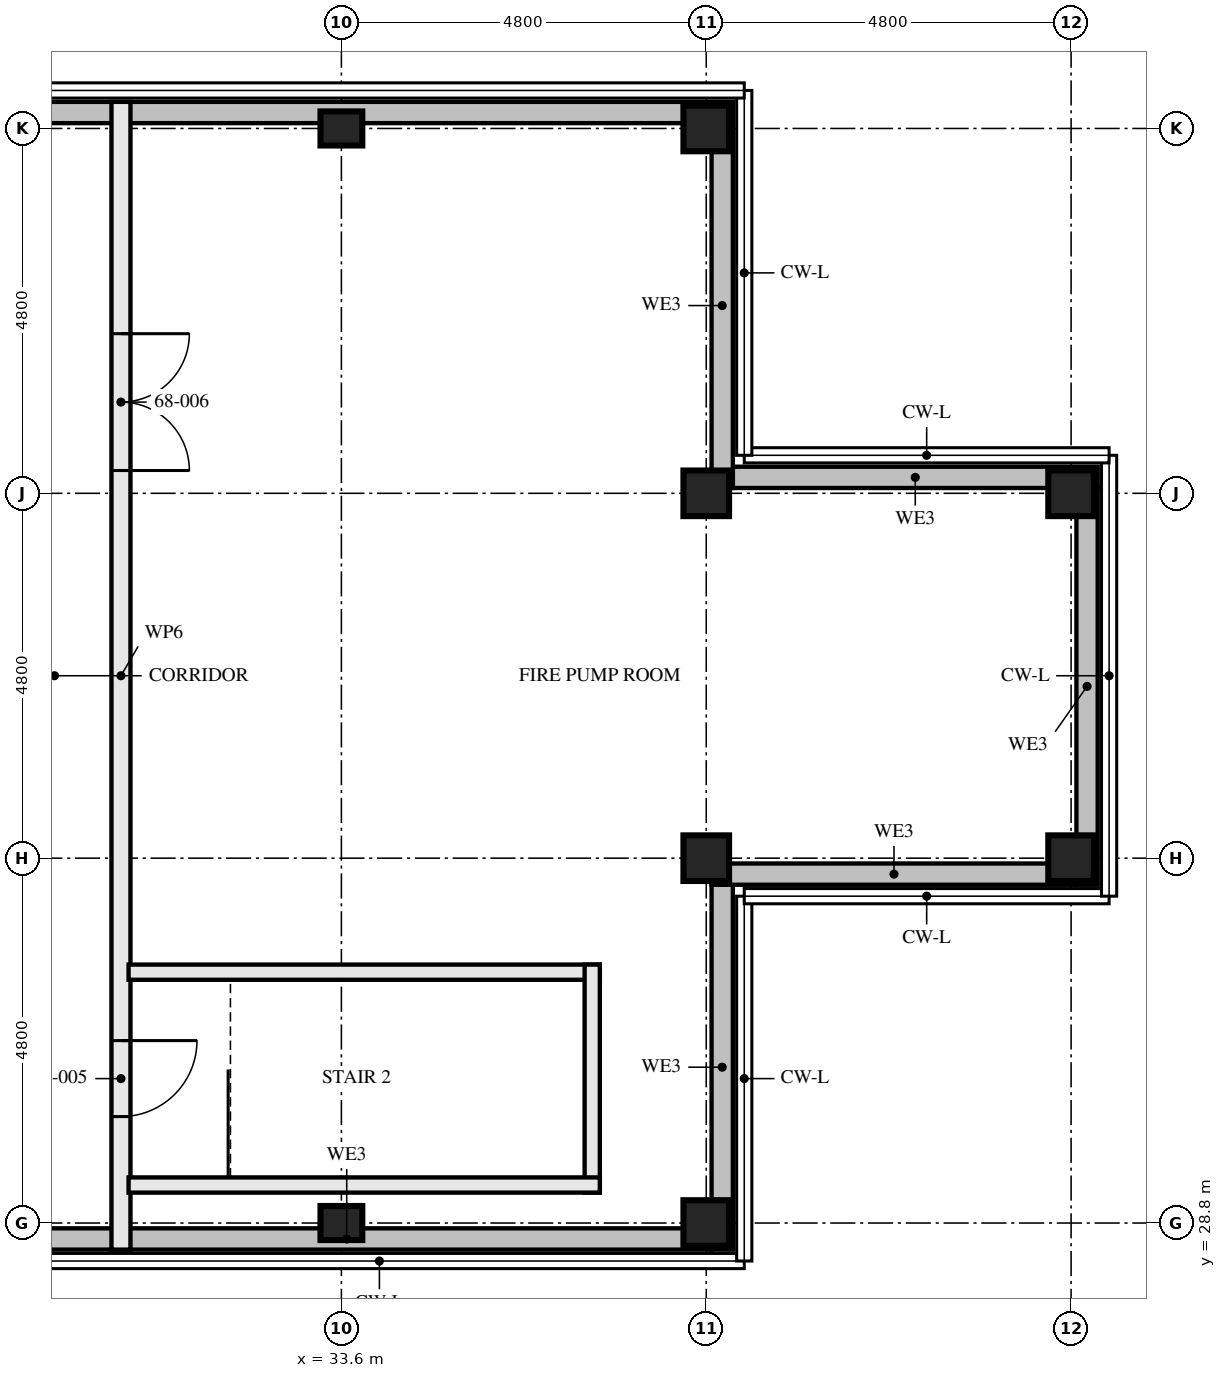
"""IFC4 building model, lengths in metres.
Left out: names, types, materials, properties, quantities, classifications, styles, units other than length and angle.
Written with IfcOpenShell. Run it as: python <this file> out.ifc"""

import sys

from ifc_helpers import new_model, si_unit, direction, frame, frame_2d, origin, origin_2d, place, context, subcontext, project, spatial, rectangle, hollow_rectangle, i_section, extrude, element, fill, save


model = new_model("IFC4")
c1 = context("Model", 3, precision=1e-05, world=origin(), true_north=direction((0.0, 1.0)))
c2 = subcontext(c1, "Body", "Model", "MODEL_VIEW")
j1 = project(units=[si_unit("LENGTHUNIT", "METRE"), si_unit("PLANEANGLEUNIT", "RADIAN")], contexts=[c1])
p1 = place(None, origin())
s1 = spatial("IfcSite", under=j1, at=p1, CompositionType="ELEMENT")
p2 = place(p1, origin())
s2 = spatial("IfcBuilding", under=s1, at=p2, CompositionType="ELEMENT")
p3 = place(p2, frame((0.0, 0.0, 248.0)))
s3 = spatial("IfcBuildingStorey", under=s2, at=p3, CompositionType="ELEMENT", Elevation=248.0)
for number, where, z_axis, x_axis in (
    (1, (33.6, 28.8, 0.0), (0.0, 0.0, 1.0), (0.0, 1.0, 0.0)),
    (2, (33.6, 43.2, 0.0), (0.0, 0.0, 1.0), (0.0, 1.0, 0.0)),
):
    element("IfcColumn", number, at=place(p3, frame(where, z_axis=z_axis, x_axis=x_axis)), inside=s3, PredefinedType="COLUMN", context=c2, shape_type="SweptSolid", body=[
        extrude(i_section(OverallWidth=0.448, OverallDepth=0.55, WebThickness=0.072, FlangeThickness=0.115, FilletRadius=0.015, at=origin_2d()), origin(), (0.0, 0.0, 1.0), 4.25),
    ])
for number, where, z_axis, x_axis in (
    (3, (38.4, 28.8, 0.0), (0.0, 0.0, 1.0), (0.0, 1.0, 0.0)),
    (4, (38.4, 33.6, 0.0), (0.0, 0.0, 1.0), (0.0, 1.0, 0.0)),
    (5, (38.4, 38.4, 0.0), (0.0, 0.0, 1.0), (0.0, 1.0, 0.0)),
    (6, (38.4, 43.2, 0.0), (0.0, 0.0, 1.0), (0.0, 1.0, 0.0)),
    (7, (43.2, 33.6, 0.0), (0.0, 0.0, 1.0), (0.0, 1.0, 0.0)),
    (8, (43.2, 38.4, 0.0), (0.0, 0.0, 1.0), (0.0, 1.0, 0.0)),
):
    element("IfcColumn", number, at=place(p3, frame(where, z_axis=z_axis, x_axis=x_axis)), inside=s3, PredefinedType="COLUMN", context=c2, shape_type="SweptSolid", body=[
        extrude(hollow_rectangle(XDim=0.6, YDim=0.6, WallThickness=0.05, at=origin_2d()), origin(), (0.0, 0.0, 1.0), 4.25),
    ])
p4 = place(p3, frame((28.87, 28.59, 4.5), z_axis=(0.0, 0.0, 1.0), x_axis=(1.0, 0.0, 0.0)))
e9 = element("IfcWall", 9, at=p4, inside=s3, PredefinedType="PARAPET", context=c2, shape_type="SweptSolid", body=[
    extrude(rectangle(XDim=9.6, YDim=0.28, at=frame_2d((4.8, 0.0))), origin(), (0.0, 0.0, 1.0), 1.1),
])
for number, where, z_axis, x_axis in (
    (10, (38.61, 28.45, 4.5), (0.0, 0.0, 1.0), (0.0, 1.0, 0.0)),
    (11, (38.47, 33.39, 4.5), (0.0, 0.0, 1.0), (1.0, 0.0, 0.0)),
):
    element("IfcWall", number, at=place(p3, frame(where, z_axis=z_axis, x_axis=x_axis)), inside=s3, PredefinedType="PARAPET", context=c2, shape_type="SweptSolid", body=[
        extrude(rectangle(XDim=4.8, YDim=0.28, at=frame_2d((2.4, 0.0))), origin(), (0.0, 0.0, 1.0), 1.1),
    ])
p5 = place(p3, frame((43.41, 33.25, 4.5), z_axis=(0.0, 0.0, 1.0), x_axis=(0.0, 1.0, 0.0)))
e12 = element("IfcWall", 12, at=p5, inside=s3, PredefinedType="PARAPET", context=c2, shape_type="SweptSolid", body=[
    extrude(rectangle(XDim=5.22, YDim=0.28, at=frame_2d((2.61, 0.0))), origin(), (0.0, 0.0, 1.0), 1.1),
])
for number, where, z_axis, x_axis in (
    (13, (43.55, 38.61, 4.5), (0.0, 0.0, 1.0), (-1.0, 0.0, 0.0)),
    (14, (38.61, 38.47, 4.5), (0.0, 0.0, 1.0), (0.0, 1.0, 0.0)),
):
    element("IfcWall", number, at=place(p3, frame(where, z_axis=z_axis, x_axis=x_axis)), inside=s3, PredefinedType="PARAPET", context=c2, shape_type="SweptSolid", body=[
        extrude(rectangle(XDim=4.8, YDim=0.28, at=frame_2d((2.4, 0.0))), origin(), (0.0, 0.0, 1.0), 1.1),
    ])
p6 = place(p3, frame((38.75, 43.41, 4.5), z_axis=(0.0, 0.0, 1.0), x_axis=(-1.0, 0.0, 0.0)))
e15 = element("IfcWall", 15, at=p6, inside=s3, PredefinedType="PARAPET", context=c2, shape_type="SweptSolid", body=[
    extrude(rectangle(XDim=34.02, YDim=0.28, at=frame_2d((17.01, 0.0))), origin(), (0.0, 0.0, 1.0), 1.1),
])
for number, where, z_axis, x_axis in (
    (16, (37.0, 29.3, 0.0), (0.0, 0.0, 1.0), (-1.0, 0.0, 0.0)),
    (17, (37.0, 32.1, 0.0), (0.0, 0.0, 1.0), (-1.0, 0.0, 0.0)),
):
    element("IfcWall", number, at=place(p3, frame(where, z_axis=z_axis, x_axis=x_axis)), inside=s3, PredefinedType="SOLIDWALL", context=c2, shape_type="SweptSolid", body=[
        extrude(rectangle(XDim=6.2, YDim=0.2, at=frame_2d((3.1, 0.0))), origin(), (0.0, 0.0, 1.0), 4.25),
    ])
p7 = place(p3, frame((36.9, 29.2, 0.0), z_axis=(0.0, 0.0, 1.0), x_axis=(0.0, 1.0, 0.0)))
e18 = element("IfcWall", 18, at=p7, inside=s3, PredefinedType="SOLIDWALL", context=c2, shape_type="SweptSolid", body=[
    extrude(rectangle(XDim=3.0, YDim=0.2, at=frame_2d((1.5, 0.0))), origin(), (0.0, 0.0, 1.0), 4.25),
])
p8 = place(p3, frame((30.7, 28.45, 0.0), z_axis=(0.0, 0.0, 1.0), x_axis=(0.0, 1.0, 0.0)))
e19 = element("IfcWall", 19, at=p8, inside=s3, PredefinedType="SOLIDWALL", context=c2, shape_type="SweptSolid", body=[
    extrude(rectangle(XDim=15.1, YDim=0.25, at=frame_2d((7.55, 0.0))), origin(), (0.0, 0.0, 1.0), 3.34),
])
p9 = place(p8, frame((1.75, 0.0, 0.0)))
e20 = element("IfcOpeningElement", 20, at=p9, cuts=e19, PredefinedType="OPENING", context=c2, shape_type="SweptSolid", body=[
    extrude(rectangle(XDim=1.0, YDim=2.1, at=frame_2d((0.5, 1.05))), frame((0.0, 0.135, 0.0), z_axis=(0.0, -1.0, 0.0), x_axis=(1.0, 0.0, 0.0)), (0.0, 0.0, 1.0), 0.271),
])
p10 = place(p8, frame((10.25, 0.0, 0.0)))
e21 = element("IfcOpeningElement", 21, at=p10, cuts=e19, PredefinedType="OPENING", context=c2, shape_type="SweptSolid", body=[
    extrude(rectangle(XDim=1.8, YDim=2.4, at=frame_2d((0.9, 1.2))), frame((0.0, 0.135, 0.0), z_axis=(0.0, -1.0, 0.0), x_axis=(1.0, 0.0, 0.0)), (0.0, 0.0, 1.0), 0.271),
])
p11 = place(p9, frame((1.0, 0.0, 0.0), z_axis=(0.0, 0.0, 1.0), x_axis=(-1.0, 0.0, 0.0)))
e22 = element("IfcDoor", 22, at=p11, inside=s3, OperationType="SINGLE_SWING_RIGHT", PredefinedType="DOOR", context=c2, shape_type="SweptSolid", body=[
    extrude(rectangle(XDim=1.0, YDim=2.1, at=frame_2d((0.5, 1.05))), frame((0.0, 0.032, 0.0), z_axis=(0.0, -1.0, 0.0), x_axis=(1.0, 0.0, 0.0)), (0.0, 0.0, 1.0), 0.064),
])
fill(e20, e22)
p12 = place(p10, frame((1.8, 0.0, 0.0), z_axis=(0.0, 0.0, 1.0), x_axis=(-1.0, 0.0, 0.0)))
e23 = element("IfcDoor", 23, at=p12, inside=s3, OperationType="DOUBLE_DOOR_SINGLE_SWING", PredefinedType="DOOR", context=c2, shape_type="SweptSolid", body=[
    extrude(rectangle(XDim=1.8, YDim=2.4, at=frame_2d((0.9, 1.2))), frame((0.0, 0.032, 0.0), z_axis=(0.0, -1.0, 0.0), x_axis=(1.0, 0.0, 0.0)), (0.0, 0.0, 1.0), 0.064),
])
fill(e21, e23)
save(model, sys.argv[1])
